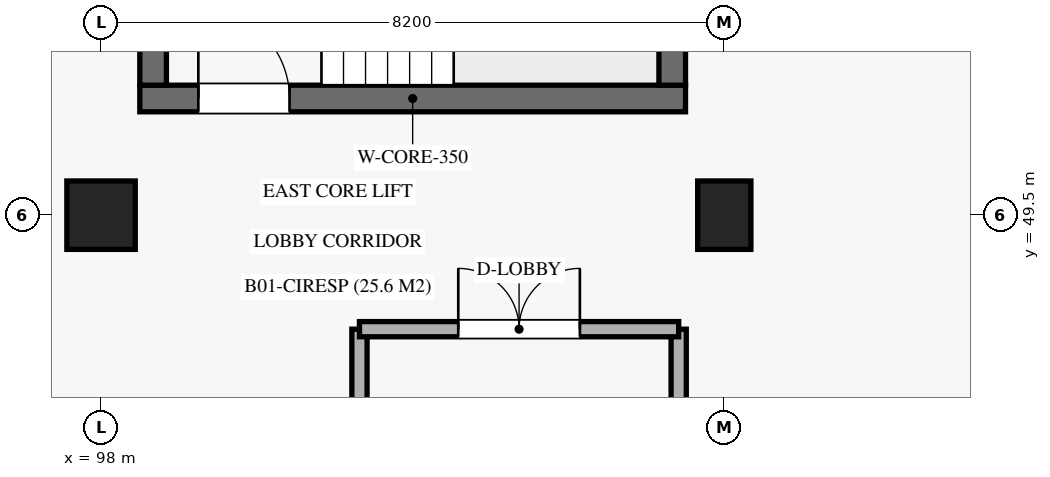
"""IFC4 building model, lengths in metres.
Left out: names, types, materials, properties, quantities, classifications, styles, units other than length and angle.
Written with IfcOpenShell. Run it as: python <this file> out.ifc"""

import sys

from ifc_helpers import new_model, si_unit, direction, frame, frame_2d, origin, origin_2d, place, context, subcontext, project, spatial, rectangle, extrude, element, fill, save


model = new_model("IFC4")
c1 = context("Model", 3, precision=1e-05, world=origin(), true_north=direction((0.0, 1.0)))
c2 = subcontext(c1, "Body", "Model", "MODEL_VIEW")
j1 = project(units=[si_unit("LENGTHUNIT", "METRE"), si_unit("PLANEANGLEUNIT", "RADIAN")], contexts=[c1])
p1 = place(None, origin())
s1 = spatial("IfcSite", under=j1, at=p1, CompositionType="ELEMENT")
p2 = place(p1, origin())
s2 = spatial("IfcBuilding", under=s1, at=p2, CompositionType="ELEMENT")
p3 = place(p2, frame((0.0, 0.0, -4.59)))
s3 = spatial("IfcBuildingStorey", under=s2, at=p3, CompositionType="ELEMENT", Elevation=-4.59)
p4 = place(p3, frame((98.0, 49.5, 0.0), z_axis=(0.0, 0.0, 1.0), x_axis=(1.0, 0.0, 0.0)))
e1 = element("IfcColumn", 1, at=p4, inside=s3, PredefinedType="COLUMN", context=c2, shape_type="SweptSolid", body=[
    extrude(rectangle(XDim=0.9, YDim=0.9, at=origin_2d()), origin(), (0.0, 0.0, 1.0), 4.59),
])
p5 = place(p3, frame((106.2, 49.5, 0.0), z_axis=(0.0, 0.0, 1.0), x_axis=(1.0, 0.0, 0.0)))
e2 = element("IfcColumn", 2, at=p5, inside=s3, PredefinedType="COLUMN", context=c2, shape_type="SweptSolid", body=[
    extrude(rectangle(XDim=0.7, YDim=0.9, at=origin_2d()), origin(), (0.0, 0.0, 1.0), 4.59),
])
p6 = place(p3, frame((98.51, 51.035, 0.0), z_axis=(0.0, 0.0, 1.0), x_axis=(1.0, 0.0, 0.0)))
e3 = element("IfcWall", 3, at=p6, inside=s3, PredefinedType="SHEAR", context=c2, shape_type="SweptSolid", body=[
    extrude(rectangle(XDim=7.18, YDim=0.35, at=frame_2d((3.59, 0.0))), origin(), (0.0, 0.0, 1.0), 4.29),
])
p7 = place(p6, frame((0.77, 0.0, 0.0)))
e4 = element("IfcOpeningElement", 4, at=p7, cuts=e3, PredefinedType="OPENING", context=c2, shape_type="SweptSolid", body=[
    extrude(rectangle(XDim=1.2, YDim=2.2, at=frame_2d((0.6, 1.1))), frame((0.0, 0.185, 0.0), z_axis=(0.0, -1.0, 0.0), x_axis=(1.0, 0.0, 0.0)), (0.0, 0.0, 1.0), 0.37),
])
for number, where, z_axis, x_axis in (
    (5, (98.685, 51.21, 0.0), (0.0, 0.0, 1.0), (0.0, 1.0, 0.0)),
    (6, (105.515, 51.21, 0.0), (0.0, 0.0, 1.0), (0.0, 1.0, 0.0)),
):
    element("IfcWall", number, at=place(p3, frame(where, z_axis=z_axis, x_axis=x_axis)), inside=s3, PredefinedType="SHEAR", context=c2, shape_type="SweptSolid", body=[
        extrude(rectangle(XDim=6.48, YDim=0.35, at=frame_2d((3.24, 0.0))), origin(), (0.0, 0.0, 1.0), 4.29),
    ])
p8 = place(p3, frame((101.4, 45.6, 0.0), z_axis=(0.0, 0.0, 1.0), x_axis=(0.0, 1.0, 0.0)))
e7 = element("IfcWall", 7, at=p8, inside=s3, PredefinedType="SOLIDWALL", context=c2, shape_type="SweptSolid", body=[
    extrude(rectangle(XDim=2.4, YDim=0.2, at=frame_2d((1.2, 0.0))), origin(), (0.0, 0.0, 1.0), 3.41),
])
p9 = place(p3, frame((105.6, 40.3, 0.0), z_axis=(0.0, 0.0, 1.0), x_axis=(0.0, 1.0, 0.0)))
e8 = element("IfcWall", 8, at=p9, inside=s3, PredefinedType="SOLIDWALL", context=c2, shape_type="SweptSolid", body=[
    extrude(rectangle(XDim=7.7, YDim=0.2, at=frame_2d((3.85, 0.0))), origin(), (0.0, 0.0, 1.0), 3.41),
])
p10 = place(p3, frame((101.4, 48.0, 0.0), z_axis=(0.0, 0.0, 1.0), x_axis=(1.0, 0.0, 0.0)))
e9 = element("IfcWall", 9, at=p10, inside=s3, PredefinedType="SOLIDWALL", context=c2, shape_type="SweptSolid", body=[
    extrude(rectangle(XDim=4.2, YDim=0.2, at=frame_2d((2.1, 0.0))), origin(), (0.0, 0.0, 1.0), 3.41),
])
p11 = place(p10, frame((1.3, 0.0, 0.0)))
e10 = element("IfcOpeningElement", 10, at=p11, cuts=e9, PredefinedType="OPENING", context=c2, shape_type="SweptSolid", body=[
    extrude(rectangle(XDim=1.6, YDim=2.2, at=frame_2d((0.8, 1.1))), frame((0.0, 0.11, 0.0), z_axis=(0.0, -1.0, 0.0), x_axis=(1.0, 0.0, 0.0)), (0.0, 0.0, 1.0), 0.22),
])
p12 = place(p7, origin())
e11 = element("IfcDoor", 11, at=p12, inside=s3, OperationType="SINGLE_SWING_LEFT", PredefinedType="DOOR", context=c2, shape_type="SweptSolid", body=[
    extrude(rectangle(XDim=1.2, YDim=2.2, at=frame_2d((0.6, 1.1))), frame((0.0, 0.025, 0.0), z_axis=(0.0, -1.0, 0.0), x_axis=(1.0, 0.0, 0.0)), (0.0, 0.0, 1.0), 0.05),
])
fill(e4, e11)
p13 = place(p11, origin())
e12 = element("IfcDoor", 12, at=p13, inside=s3, OperationType="DOUBLE_DOOR_SINGLE_SWING", PredefinedType="DOOR", context=c2, shape_type="SweptSolid", body=[
    extrude(rectangle(XDim=1.6, YDim=2.2, at=frame_2d((0.8, 1.1))), frame((0.0, 0.025, 0.0), z_axis=(0.0, -1.0, 0.0), x_axis=(1.0, 0.0, 0.0)), (0.0, 0.0, 1.0), 0.05),
])
fill(e10, e12)
save(model, sys.argv[1])
